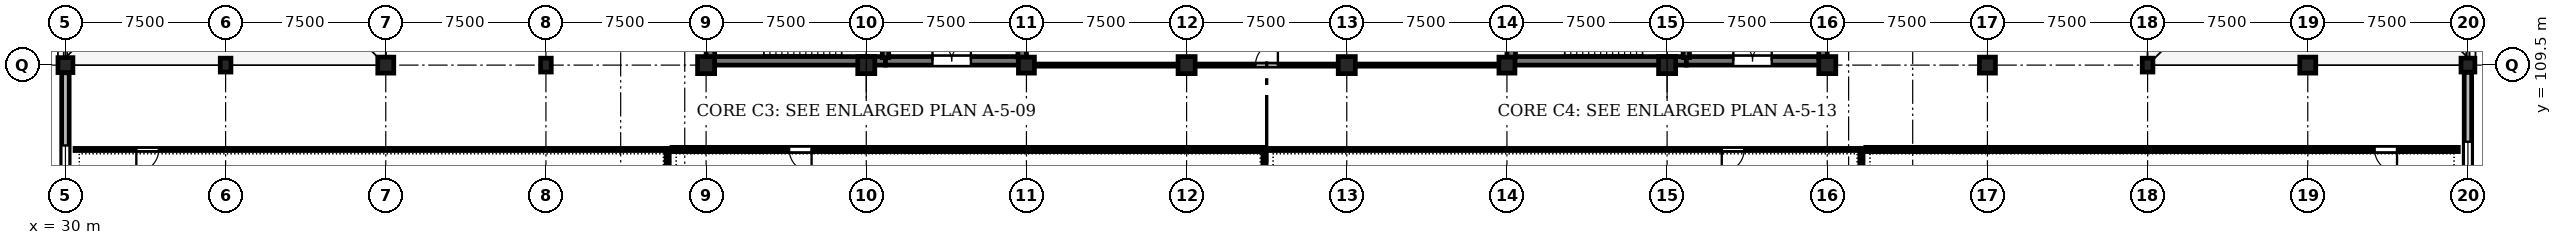
"""IFC4 building model, lengths in metres.
Left out: names, types, materials, properties, quantities, classifications, styles, units other than length and angle.
Written with IfcOpenShell. Run it as: python <this file> out.ifc"""

import sys

from ifc_helpers import new_model, si_unit, direction, frame, frame_2d, origin, origin_2d, place, context, subcontext, project, spatial, rectangle, circle, extrude, element, fill, save


model = new_model("IFC4")
c1 = context("Model", 3, precision=1e-05, world=origin(), true_north=direction((0.0, 1.0)))
c2 = subcontext(c1, "Body", "Model", "MODEL_VIEW")
j1 = project(units=[si_unit("LENGTHUNIT", "METRE"), si_unit("PLANEANGLEUNIT", "RADIAN")], contexts=[c1])
p1 = place(None, origin())
s1 = spatial("IfcSite", under=j1, at=p1, CompositionType="ELEMENT")
p2 = place(p1, origin())
s2 = spatial("IfcBuilding", under=s1, at=p2, CompositionType="ELEMENT")
p3 = place(p2, origin())
s3 = spatial("IfcBuildingStorey", under=s2, at=p3, CompositionType="ELEMENT", Elevation=0.0)
p4 = place(p3, frame((30.0, 109.5, 0.0), z_axis=(0.0, 0.0, 1.0), x_axis=(1.0, 0.0, 0.0)))
e1 = element("IfcColumn", 1, at=p4, inside=s3, PredefinedType="COLUMN", context=c2, shape_type="SweptSolid", body=[
    extrude(rectangle(XDim=0.7, YDim=0.7, at=origin_2d()), origin(), (0.0, 0.0, 1.0), 4.8),
])
p5 = place(p3, frame((37.5, 109.5, 0.0), z_axis=(0.0, 0.0, 1.0), x_axis=(1.0, 0.0, 0.0)))
e2 = element("IfcColumn", 2, at=p5, inside=s3, PredefinedType="COLUMN", context=c2, shape_type="SweptSolid", body=[
    extrude(rectangle(XDim=0.5, YDim=0.65, at=origin_2d()), origin(), (0.0, 0.0, 1.0), 4.8),
])
p6 = place(p3, frame((45.0, 109.5, 0.0), z_axis=(0.0, 0.0, 1.0), x_axis=(1.0, 0.0, 0.0)))
e3 = element("IfcColumn", 3, at=p6, inside=s3, PredefinedType="COLUMN", context=c2, shape_type="SweptSolid", body=[
    extrude(rectangle(XDim=0.75, YDim=0.75, at=origin_2d()), origin(), (0.0, 0.0, 1.0), 4.8),
])
p7 = place(p3, frame((52.5, 109.5, 0.0), z_axis=(0.0, 0.0, 1.0), x_axis=(1.0, 0.0, 0.0)))
e4 = element("IfcColumn", 4, at=p7, inside=s3, PredefinedType="COLUMN", context=c2, shape_type="SweptSolid", body=[
    extrude(rectangle(XDim=0.5, YDim=0.65, at=origin_2d()), origin(), (0.0, 0.0, 1.0), 4.8),
])
for number, where, z_axis, x_axis in (
    (5, (60.0, 109.5, 0.0), (0.0, 0.0, 1.0), (1.0, 0.0, 0.0)),
    (6, (67.5, 109.5, 0.0), (0.0, 0.0, 1.0), (1.0, 0.0, 0.0)),
):
    element("IfcColumn", number, at=place(p3, frame(where, z_axis=z_axis, x_axis=x_axis)), inside=s3, PredefinedType="COLUMN", context=c2, shape_type="SweptSolid", body=[
        extrude(rectangle(XDim=0.8, YDim=0.8, at=origin_2d()), origin(), (0.0, 0.0, 1.0), 4.8),
    ])
p8 = place(p3, frame((75.0, 109.5, 0.0), z_axis=(0.0, 0.0, 1.0), x_axis=(1.0, 0.0, 0.0)))
e7 = element("IfcColumn", 7, at=p8, inside=s3, PredefinedType="COLUMN", context=c2, shape_type="SweptSolid", body=[
    extrude(circle(Radius=0.375, at=origin_2d()), origin(), (0.0, 0.0, 1.0), 4.8),
])
for number, where, z_axis, x_axis in (
    (8, (82.5, 109.5, 0.0), (0.0, 0.0, 1.0), (1.0, 0.0, 0.0)),
    (9, (90.0, 109.5, 0.0), (0.0, 0.0, 1.0), (1.0, 0.0, 0.0)),
):
    element("IfcColumn", number, at=place(p3, frame(where, z_axis=z_axis, x_axis=x_axis)), inside=s3, PredefinedType="COLUMN", context=c2, shape_type="SweptSolid", body=[
        extrude(rectangle(XDim=0.8, YDim=0.8, at=origin_2d()), origin(), (0.0, 0.0, 1.0), 4.8),
    ])
p9 = place(p3, frame((97.5, 109.5, 0.0), z_axis=(0.0, 0.0, 1.0), x_axis=(1.0, 0.0, 0.0)))
e10 = element("IfcColumn", 10, at=p9, inside=s3, PredefinedType="COLUMN", context=c2, shape_type="SweptSolid", body=[
    extrude(circle(Radius=0.375, at=origin_2d()), origin(), (0.0, 0.0, 1.0), 4.8),
])
for number, where, z_axis, x_axis in (
    (11, (105.0, 109.5, 0.0), (0.0, 0.0, 1.0), (1.0, 0.0, 0.0)),
    (12, (112.5, 109.5, 0.0), (0.0, 0.0, 1.0), (1.0, 0.0, 0.0)),
):
    element("IfcColumn", number, at=place(p3, frame(where, z_axis=z_axis, x_axis=x_axis)), inside=s3, PredefinedType="COLUMN", context=c2, shape_type="SweptSolid", body=[
        extrude(rectangle(XDim=0.8, YDim=0.8, at=origin_2d()), origin(), (0.0, 0.0, 1.0), 4.8),
    ])
p10 = place(p3, frame((120.0, 109.5, 0.0), z_axis=(0.0, 0.0, 1.0), x_axis=(1.0, 0.0, 0.0)))
e13 = element("IfcColumn", 13, at=p10, inside=s3, PredefinedType="COLUMN", context=c2, shape_type="SweptSolid", body=[
    extrude(rectangle(XDim=0.75, YDim=0.75, at=origin_2d()), origin(), (0.0, 0.0, 1.0), 4.8),
])
p11 = place(p3, frame((127.5, 109.5, 0.0), z_axis=(0.0, 0.0, 1.0), x_axis=(1.0, 0.0, 0.0)))
e14 = element("IfcColumn", 14, at=p11, inside=s3, PredefinedType="COLUMN", context=c2, shape_type="SweptSolid", body=[
    extrude(rectangle(XDim=0.5, YDim=0.65, at=origin_2d()), origin(), (0.0, 0.0, 1.0), 4.8),
])
p12 = place(p3, frame((135.0, 109.5, 0.0), z_axis=(0.0, 0.0, 1.0), x_axis=(1.0, 0.0, 0.0)))
e15 = element("IfcColumn", 15, at=p12, inside=s3, PredefinedType="COLUMN", context=c2, shape_type="SweptSolid", body=[
    extrude(rectangle(XDim=0.75, YDim=0.75, at=origin_2d()), origin(), (0.0, 0.0, 1.0), 4.8),
])
p13 = place(p3, frame((142.5, 109.5, 0.0), z_axis=(0.0, 0.0, 1.0), x_axis=(1.0, 0.0, 0.0)))
e16 = element("IfcColumn", 16, at=p13, inside=s3, PredefinedType="COLUMN", context=c2, shape_type="SweptSolid", body=[
    extrude(rectangle(XDim=0.65, YDim=0.65, at=origin_2d()), origin(), (0.0, 0.0, 1.0), 4.8),
])
p14 = place(p3, frame((30.0, 100.835, 0.0), z_axis=(0.0, 0.0, 1.0), x_axis=(0.0, 1.0, 0.0)))
e17 = element("IfcWall", 17, at=p14, inside=s3, PredefinedType="STANDARD", context=c2, shape_type="SweptSolid", body=[
    extrude(rectangle(XDim=8.305, YDim=0.35, at=frame_2d((4.152, 0.0))), origin(), (0.0, 0.0, 1.0), 3.95),
])
p15 = place(p14, frame((3.403, 0.0, 0.9)))
e18 = element("IfcOpeningElement", 18, at=p15, cuts=e17, PredefinedType="OPENING", context=c2, shape_type="SweptSolid", body=[
    extrude(rectangle(XDim=1.5, YDim=2.4, at=frame_2d((0.75, 1.2))), frame((0.0, 0.185, 0.0), z_axis=(0.0, -1.0, 0.0), x_axis=(1.0, 0.0, 0.0)), (0.0, 0.0, 1.0), 0.37),
])
p16 = place(p3, frame((142.5, 109.165, 0.0), z_axis=(0.0, 0.0, 1.0), x_axis=(0.0, -1.0, 0.0)))
e19 = element("IfcWall", 19, at=p16, inside=s3, PredefinedType="STANDARD", context=c2, shape_type="SweptSolid", body=[
    extrude(rectangle(XDim=8.305, YDim=0.35, at=frame_2d((4.152, 0.0))), origin(), (0.0, 0.0, 1.0), 3.95),
])
p17 = place(p16, frame((3.252, 0.0, 0.9)))
e20 = element("IfcOpeningElement", 20, at=p17, cuts=e19, PredefinedType="OPENING", context=c2, shape_type="SweptSolid", body=[
    extrude(rectangle(XDim=1.8, YDim=2.4, at=frame_2d((0.9, 1.2))), frame((0.0, 0.185, 0.0), z_axis=(0.0, -1.0, 0.0), x_axis=(1.0, 0.0, 0.0)), (0.0, 0.0, 1.0), 0.37),
])
p18 = place(p3, frame((60.35, 109.7, 0.0), z_axis=(0.0, 0.0, 1.0), x_axis=(1.0, 0.0, 0.0)))
e21 = element("IfcWall", 21, at=p18, inside=s3, PredefinedType="SHEAR", context=c2, shape_type="SweptSolid", body=[
    extrude(rectangle(XDim=8.05, YDim=0.4, at=frame_2d((4.025, 0.0))), origin(), (0.0, 0.0, 1.0), 4.5),
])
p19 = place(p3, frame((68.4, 109.7, 0.0), z_axis=(0.0, 0.0, 1.0), x_axis=(1.0, 0.0, 0.0)))
e22 = element("IfcWall", 22, at=p19, inside=s3, PredefinedType="SHEAR", context=c2, shape_type="SweptSolid", body=[
    extrude(rectangle(XDim=6.25, YDim=0.4, at=frame_2d((3.125, 0.0))), origin(), (0.0, 0.0, 1.0), 4.5),
])
p20 = place(p19, frame((2.2, 0.0, 0.0)))
e23 = element("IfcOpeningElement", 23, at=p20, cuts=e22, PredefinedType="OPENING", context=c2, shape_type="SweptSolid", body=[
    extrude(rectangle(XDim=1.8, YDim=2.25, at=frame_2d((0.9, 1.125))), frame((0.0, 0.21, 0.0), z_axis=(0.0, -1.0, 0.0), x_axis=(1.0, 0.0, 0.0)), (0.0, 0.0, 1.0), 0.42),
])
p21 = place(p3, frame((60.2, 109.85, 0.0), z_axis=(0.0, 0.0, 1.0), x_axis=(0.0, 1.0, 0.0)))
e24 = element("IfcWall", 24, at=p21, inside=s3, PredefinedType="SHEAR", context=c2, shape_type="SweptSolid", body=[
    extrude(rectangle(XDim=6.8, YDim=0.4, at=frame_2d((3.4, 0.0))), origin(), (0.0, 0.0, 1.0), 4.5),
])
p22 = place(p3, frame((74.8, 109.85, 0.0), z_axis=(0.0, 0.0, 1.0), x_axis=(0.0, 1.0, 0.0)))
e25 = element("IfcWall", 25, at=p22, inside=s3, PredefinedType="SHEAR", context=c2, shape_type="SweptSolid", body=[
    extrude(rectangle(XDim=3.75, YDim=0.4, at=frame_2d((1.875, 0.0))), origin(), (0.0, 0.0, 1.0), 4.5),
])
p23 = place(p3, frame((68.4, 113.5, 0.0), z_axis=(0.0, 0.0, 1.0), x_axis=(0.0, -1.0, 0.0)))
e26 = element("IfcWall", 26, at=p23, inside=s3, PredefinedType="SHEAR", context=c2, shape_type="SweptSolid", body=[
    extrude(rectangle(XDim=3.65, YDim=0.3, at=frame_2d((1.825, 0.0))), origin(), (0.0, 0.0, 1.0), 4.5),
])
p24 = place(p23, frame((1.22, 0.0, 0.0)))
e27 = element("IfcOpeningElement", 27, at=p24, cuts=e26, PredefinedType="OPENING", context=c2, shape_type="SweptSolid", body=[
    extrude(rectangle(XDim=1.2, YDim=2.25, at=frame_2d((0.6, 1.125))), frame((0.0, 0.16, 0.0), z_axis=(0.0, -1.0, 0.0), x_axis=(1.0, 0.0, 0.0)), (0.0, 0.0, 1.0), 0.32),
])
p25 = place(p3, frame((97.85, 109.7, 0.0), z_axis=(0.0, 0.0, 1.0), x_axis=(1.0, 0.0, 0.0)))
e28 = element("IfcWall", 28, at=p25, inside=s3, PredefinedType="SHEAR", context=c2, shape_type="SweptSolid", body=[
    extrude(rectangle(XDim=8.05, YDim=0.4, at=frame_2d((4.025, 0.0))), origin(), (0.0, 0.0, 1.0), 4.5),
])
p26 = place(p3, frame((105.9, 109.7, 0.0), z_axis=(0.0, 0.0, 1.0), x_axis=(1.0, 0.0, 0.0)))
e29 = element("IfcWall", 29, at=p26, inside=s3, PredefinedType="SHEAR", context=c2, shape_type="SweptSolid", body=[
    extrude(rectangle(XDim=6.25, YDim=0.4, at=frame_2d((3.125, 0.0))), origin(), (0.0, 0.0, 1.0), 4.5),
])
p27 = place(p26, frame((2.2, 0.0, 0.0)))
e30 = element("IfcOpeningElement", 30, at=p27, cuts=e29, PredefinedType="OPENING", context=c2, shape_type="SweptSolid", body=[
    extrude(rectangle(XDim=1.8, YDim=2.25, at=frame_2d((0.9, 1.125))), frame((0.0, 0.21, 0.0), z_axis=(0.0, -1.0, 0.0), x_axis=(1.0, 0.0, 0.0)), (0.0, 0.0, 1.0), 0.42),
])
p28 = place(p3, frame((97.7, 109.85, 0.0), z_axis=(0.0, 0.0, 1.0), x_axis=(0.0, 1.0, 0.0)))
e31 = element("IfcWall", 31, at=p28, inside=s3, PredefinedType="SHEAR", context=c2, shape_type="SweptSolid", body=[
    extrude(rectangle(XDim=6.8, YDim=0.4, at=frame_2d((3.4, 0.0))), origin(), (0.0, 0.0, 1.0), 4.5),
])
p29 = place(p3, frame((112.3, 109.85, 0.0), z_axis=(0.0, 0.0, 1.0), x_axis=(0.0, 1.0, 0.0)))
e32 = element("IfcWall", 32, at=p29, inside=s3, PredefinedType="SHEAR", context=c2, shape_type="SweptSolid", body=[
    extrude(rectangle(XDim=3.75, YDim=0.4, at=frame_2d((1.875, 0.0))), origin(), (0.0, 0.0, 1.0), 4.5),
])
p30 = place(p3, frame((105.9, 113.5, 0.0), z_axis=(0.0, 0.0, 1.0), x_axis=(0.0, -1.0, 0.0)))
e33 = element("IfcWall", 33, at=p30, inside=s3, PredefinedType="SHEAR", context=c2, shape_type="SweptSolid", body=[
    extrude(rectangle(XDim=3.65, YDim=0.3, at=frame_2d((1.825, 0.0))), origin(), (0.0, 0.0, 1.0), 4.5),
])
p31 = place(p30, frame((1.22, 0.0, 0.0)))
e34 = element("IfcOpeningElement", 34, at=p31, cuts=e33, PredefinedType="OPENING", context=c2, shape_type="SweptSolid", body=[
    extrude(rectangle(XDim=1.2, YDim=2.25, at=frame_2d((0.6, 1.125))), frame((0.0, 0.16, 0.0), z_axis=(0.0, -1.0, 0.0), x_axis=(1.0, 0.0, 0.0)), (0.0, 0.0, 1.0), 0.32),
])
p32 = place(p3, frame((58.2, 105.55, 0.0), z_axis=(0.0, 0.0, 1.0), x_axis=(-1.0, 0.0, 0.0)))
e35 = element("IfcWall", 35, at=p32, inside=s3, PredefinedType="PARTITIONING", context=c2, shape_type="SweptSolid", body=[
    extrude(rectangle(XDim=27.75, YDim=0.1, at=frame_2d((13.875, 0.0))), origin(), (0.0, 0.0, 1.0), 4.485),
])
p33 = place(p32, frame((23.83, 0.0, 0.0)))
e36 = element("IfcOpeningElement", 36, at=p33, cuts=e35, PredefinedType="OPENING", context=c2, shape_type="SweptSolid", body=[
    extrude(rectangle(XDim=1.05, YDim=2.2, at=frame_2d((0.525, 1.1))), frame((0.0, 0.06, 0.0), z_axis=(0.0, -1.0, 0.0), x_axis=(1.0, 0.0, 0.0)), (0.0, 0.0, 1.0), 0.12),
])
p34 = place(p3, frame((86.15, 105.55, 0.0), z_axis=(0.0, 0.0, 1.0), x_axis=(-1.0, 0.0, 0.0)))
e37 = element("IfcWall", 37, at=p34, inside=s3, PredefinedType="STANDARD", context=c2, shape_type="SweptSolid", body=[
    extrude(rectangle(XDim=27.75, YDim=0.2, at=frame_2d((13.875, 0.0))), origin(), (0.0, 0.0, 1.0), 4.485),
])
p35 = place(p34, frame((21.21, 0.0, 0.0)))
e38 = element("IfcOpeningElement", 38, at=p35, cuts=e37, PredefinedType="OPENING", context=c2, shape_type="SweptSolid", body=[
    extrude(rectangle(XDim=1.05, YDim=2.2, at=frame_2d((0.525, 1.1))), frame((0.0, 0.11, 0.0), z_axis=(0.0, -1.0, 0.0), x_axis=(1.0, 0.0, 0.0)), (0.0, 0.0, 1.0), 0.22),
])
p36 = place(p3, frame((114.1, 105.55, 0.0), z_axis=(0.0, 0.0, 1.0), x_axis=(-1.0, 0.0, 0.0)))
e39 = element("IfcWall", 39, at=p36, inside=s3, PredefinedType="PARTITIONING", context=c2, shape_type="SweptSolid", body=[
    extrude(rectangle(XDim=27.75, YDim=0.1, at=frame_2d((13.875, 0.0))), origin(), (0.0, 0.0, 1.0), 4.485),
])
p37 = place(p36, frame((5.49, 0.0, 0.0)))
e40 = element("IfcOpeningElement", 40, at=p37, cuts=e39, PredefinedType="OPENING", context=c2, shape_type="SweptSolid", body=[
    extrude(rectangle(XDim=1.05, YDim=2.2, at=frame_2d((0.525, 1.1))), frame((0.0, 0.06, 0.0), z_axis=(0.0, -1.0, 0.0), x_axis=(1.0, 0.0, 0.0)), (0.0, 0.0, 1.0), 0.12),
])
p38 = place(p3, frame((142.05, 105.55, 0.0), z_axis=(0.0, 0.0, 1.0), x_axis=(-1.0, 0.0, 0.0)))
e41 = element("IfcWall", 41, at=p38, inside=s3, PredefinedType="STANDARD", context=c2, shape_type="SweptSolid", body=[
    extrude(rectangle(XDim=27.75, YDim=0.2, at=frame_2d((13.875, 0.0))), origin(), (0.0, 0.0, 1.0), 4.485),
])
p39 = place(p38, frame((2.87, 0.0, 0.0)))
e42 = element("IfcOpeningElement", 42, at=p39, cuts=e41, PredefinedType="OPENING", context=c2, shape_type="SweptSolid", body=[
    extrude(rectangle(XDim=1.05, YDim=2.2, at=frame_2d((0.525, 1.1))), frame((0.0, 0.11, 0.0), z_axis=(0.0, -1.0, 0.0), x_axis=(1.0, 0.0, 0.0)), (0.0, 0.0, 1.0), 0.22),
])
p40 = place(p3, frame((75.3, 109.5, 0.0), z_axis=(0.0, 0.0, 1.0), x_axis=(1.0, 0.0, 0.0)))
e43 = element("IfcWall", 43, at=p40, inside=s3, PredefinedType="PARTITIONING", context=c2, shape_type="SweptSolid", body=[
    extrude(rectangle(XDim=21.9, YDim=0.1, at=frame_2d((10.95, 0.0))), origin(), (0.0, 0.0, 1.0), 3.835),
])
p41 = place(p40, frame((10.425, 0.0, 0.0)))
e44 = element("IfcOpeningElement", 44, at=p41, cuts=e43, PredefinedType="OPENING", context=c2, shape_type="SweptSolid", body=[
    extrude(rectangle(XDim=1.05, YDim=2.2, at=frame_2d((0.525, 1.1))), frame((0.0, 0.06, 0.0), z_axis=(0.0, -1.0, 0.0), x_axis=(1.0, 0.0, 0.0)), (0.0, 0.0, 1.0), 0.12),
])
p42 = place(p3, frame((58.2, 76.85, 0.0), z_axis=(0.0, 0.0, 1.0), x_axis=(0.0, 1.0, 0.0)))
e45 = element("IfcWall", 45, at=p42, inside=s3, PredefinedType="PARTITIONING", context=c2, shape_type="SweptSolid", body=[
    extrude(rectangle(XDim=28.7, YDim=0.15, at=frame_2d((14.35, 0.0))), origin(), (0.0, 0.0, 1.0), 4.485),
])
p43 = place(p3, frame((86.15, 76.85, 0.0), z_axis=(0.0, 0.0, 1.0), x_axis=(0.0, 1.0, 0.0)))
e46 = element("IfcWall", 46, at=p43, inside=s3, PredefinedType="PARTITIONING", context=c2, shape_type="SweptSolid", body=[
    extrude(rectangle(XDim=28.7, YDim=0.15, at=frame_2d((14.35, 0.0))), origin(), (0.0, 0.0, 1.0), 4.085),
])
p44 = place(p3, frame((114.1, 76.85, 0.0), z_axis=(0.0, 0.0, 1.0), x_axis=(0.0, 1.0, 0.0)))
e47 = element("IfcWall", 47, at=p44, inside=s3, PredefinedType="PARTITIONING", context=c2, shape_type="SweptSolid", body=[
    extrude(rectangle(XDim=28.7, YDim=0.15, at=frame_2d((14.35, 0.0))), origin(), (0.0, 0.0, 1.0), 4.485),
])
p45 = place(p15, origin())
e48 = element("IfcWindow", 48, at=p45, inside=s3, PartitioningType="SINGLE_PANEL", PredefinedType="WINDOW", context=c2, shape_type="SweptSolid", body=[
    extrude(rectangle(XDim=1.5, YDim=2.4, at=frame_2d((0.75, 1.2))), frame((0.0, 0.03, 0.0), z_axis=(0.0, -1.0, 0.0), x_axis=(1.0, 0.0, 0.0)), (0.0, 0.0, 1.0), 0.06),
])
fill(e18, e48)
p46 = place(p17, origin())
e49 = element("IfcWindow", 49, at=p46, inside=s3, PartitioningType="SINGLE_PANEL", PredefinedType="WINDOW", context=c2, shape_type="SweptSolid", body=[
    extrude(rectangle(XDim=1.8, YDim=2.4, at=frame_2d((0.9, 1.2))), frame((0.0, 0.03, 0.0), z_axis=(0.0, -1.0, 0.0), x_axis=(1.0, 0.0, 0.0)), (0.0, 0.0, 1.0), 0.06),
])
fill(e20, e49)
p47 = place(p20, origin())
e50 = element("IfcDoor", 50, at=p47, inside=s3, OperationType="DOUBLE_DOOR_SINGLE_SWING", PredefinedType="DOOR", context=c2, shape_type="SweptSolid", body=[
    extrude(rectangle(XDim=1.8, YDim=2.25, at=frame_2d((0.9, 1.125))), frame((0.0, 0.025, 0.0), z_axis=(0.0, -1.0, 0.0), x_axis=(1.0, 0.0, 0.0)), (0.0, 0.0, 1.0), 0.05),
])
fill(e23, e50)
p48 = place(p27, origin())
e51 = element("IfcDoor", 51, at=p48, inside=s3, OperationType="DOUBLE_DOOR_SINGLE_SWING", PredefinedType="DOOR", context=c2, shape_type="SweptSolid", body=[
    extrude(rectangle(XDim=1.8, YDim=2.25, at=frame_2d((0.9, 1.125))), frame((0.0, 0.025, 0.0), z_axis=(0.0, -1.0, 0.0), x_axis=(1.0, 0.0, 0.0)), (0.0, 0.0, 1.0), 0.05),
])
fill(e30, e51)
p49 = place(p33, origin())
e52 = element("IfcDoor", 52, at=p49, inside=s3, OperationType="SINGLE_SWING_RIGHT", PredefinedType="DOOR", context=c2, shape_type="SweptSolid", body=[
    extrude(rectangle(XDim=1.05, YDim=2.2, at=frame_2d((0.525, 1.1))), frame((0.0, 0.025, 0.0), z_axis=(0.0, -1.0, 0.0), x_axis=(1.0, 0.0, 0.0)), (0.0, 0.0, 1.0), 0.05),
])
fill(e36, e52)
p50 = place(p35, origin())
e53 = element("IfcDoor", 53, at=p50, inside=s3, OperationType="SINGLE_SWING_LEFT", PredefinedType="DOOR", context=c2, shape_type="SweptSolid", body=[
    extrude(rectangle(XDim=1.05, YDim=2.2, at=frame_2d((0.525, 1.1))), frame((0.0, 0.025, 0.0), z_axis=(0.0, -1.0, 0.0), x_axis=(1.0, 0.0, 0.0)), (0.0, 0.0, 1.0), 0.05),
])
fill(e38, e53)
p51 = place(p37, origin())
e54 = element("IfcDoor", 54, at=p51, inside=s3, OperationType="SINGLE_SWING_RIGHT", PredefinedType="DOOR", context=c2, shape_type="SweptSolid", body=[
    extrude(rectangle(XDim=1.05, YDim=2.2, at=frame_2d((0.525, 1.1))), frame((0.0, 0.025, 0.0), z_axis=(0.0, -1.0, 0.0), x_axis=(1.0, 0.0, 0.0)), (0.0, 0.0, 1.0), 0.05),
])
fill(e40, e54)
p52 = place(p39, origin())
e55 = element("IfcDoor", 55, at=p52, inside=s3, OperationType="SINGLE_SWING_LEFT", PredefinedType="DOOR", context=c2, shape_type="SweptSolid", body=[
    extrude(rectangle(XDim=1.05, YDim=2.2, at=frame_2d((0.525, 1.1))), frame((0.0, 0.025, 0.0), z_axis=(0.0, -1.0, 0.0), x_axis=(1.0, 0.0, 0.0)), (0.0, 0.0, 1.0), 0.05),
])
fill(e42, e55)
p53 = place(p41, origin())
e56 = element("IfcDoor", 56, at=p53, inside=s3, OperationType="SINGLE_SWING_RIGHT", PredefinedType="DOOR", context=c2, shape_type="SweptSolid", body=[
    extrude(rectangle(XDim=1.05, YDim=2.2, at=frame_2d((0.525, 1.1))), frame((0.0, 0.025, 0.0), z_axis=(0.0, -1.0, 0.0), x_axis=(1.0, 0.0, 0.0)), (0.0, 0.0, 1.0), 0.05),
])
fill(e44, e56)
save(model, sys.argv[1])
